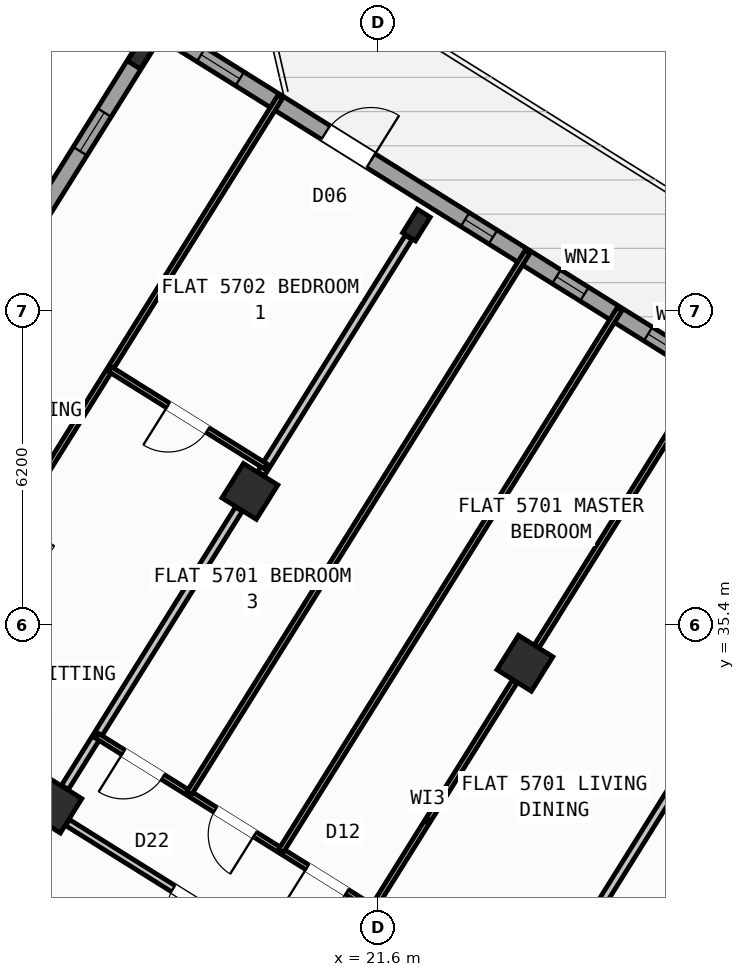
"""IFC4 building model, lengths in metres.
Left out: names, types, materials, properties, quantities, classifications, styles, units other than length and angle.
Written with IfcOpenShell. Run it as: python <this file> out.ifc"""

import sys

from ifc_helpers import new_model, si_unit, direction, frame, frame_2d, origin, origin_2d, place, context, subcontext, project, spatial, rectangle, hollow_rectangle, i_section, extrude, source, transform, mapped, element, fill, save


model = new_model("IFC4")
c1 = context("Model", 3, precision=1e-05, world=origin(), true_north=direction((0.0, 1.0)))
c2 = subcontext(c1, "Body", "Model", "MODEL_VIEW")
j1 = project(units=[si_unit("LENGTHUNIT", "METRE"), si_unit("PLANEANGLEUNIT", "RADIAN")], contexts=[c1])
p1 = place(None, origin())
s1 = spatial("IfcSite", under=j1, at=p1, CompositionType="ELEMENT")
p2 = place(p1, origin())
s2 = spatial("IfcBuilding", under=s1, at=p2, CompositionType="ELEMENT")
p3 = place(p2, frame((0.0, 0.0, 225.6)))
s3 = spatial("IfcBuildingStorey", under=s2, at=p3, CompositionType="ELEMENT", Elevation=225.6)
m1 = source(origin(), c2, "Body", "SweptSolid", [
    extrude(hollow_rectangle(XDim=0.8, YDim=0.8, WallThickness=0.032, at=origin_2d()), origin(), (0.0, 0.0, 1.0), 3.6),
])
p4 = place(p3, frame((24.5, 34.643, 0.0), z_axis=(0.0, 0.0, 1.0), x_axis=(-0.848048096156, 0.529919264233, 0.0)))
e1 = element("IfcColumn", 1, at=p4, inside=s3, PredefinedType="COLUMN", context=c2, shape_type="MappedRepresentation", body=[
    mapped(m1, transform((0.0, 0.0, 0.0), scale=1.0)),
])
m2 = source(origin(), c2, "Body", "SweptSolid", [
    extrude(i_section(OverallWidth=0.3, OverallDepth=0.55, WebThickness=0.015, FlangeThickness=0.029, at=origin_2d()), origin(), (0.0, 0.0, 1.0), 3.6),
])
p5 = place(p3, frame((22.358, 43.292, 0.0), z_axis=(0.0, 0.0, 1.0), x_axis=(-0.848048096156, 0.529919264233, 0.0)))
e2 = element("IfcColumn", 2, at=p5, inside=s3, PredefinedType="COLUMN", context=c2, shape_type="MappedRepresentation", body=[
    mapped(m2, transform((0.0, 0.0, 0.0), scale=1.0)),
])
for number, where, z_axis, x_axis in (
    (3, (19.073, 38.034, 0.0), (0.0, 0.0, 1.0), (-0.848, 0.53, 0.0)),
    (4, (15.205, 31.844, 0.0), (0.0, 0.0, 1.0), (-0.848, 0.53, 0.0)),
):
    element("IfcColumn", number, at=place(p3, frame(where, z_axis=z_axis, x_axis=x_axis)), inside=s3, PredefinedType="COLUMN", context=c2, shape_type="MappedRepresentation", body=[
        mapped(m1, transform((0.0, 0.0, 0.0), scale=1.0)),
    ])
p6 = place(p3, frame((16.931, 46.684, 0.0), z_axis=(0.0, 0.0, 1.0), x_axis=(-0.848048096156, 0.529919264233, 0.0)))
e5 = element("IfcColumn", 5, at=p6, inside=s3, PredefinedType="COLUMN", context=c2, shape_type="MappedRepresentation", body=[
    mapped(m2, transform((0.0, 0.0, 0.0), scale=1.0)),
])
p7 = place(p3, frame((5.7, 28.71, 0.0), z_axis=(0.0, 0.0, 1.0), x_axis=(0.529923711467, 0.8480453172, 0.0)))
e6 = element("IfcWall", 6, at=p7, inside=s3, PredefinedType="STANDARD", context=c2, shape_type="SweptSolid", body=[
    extrude(rectangle(XDim=21.587, YDim=0.32, at=frame_2d((10.794, 0.0))), origin(), (0.0, 0.0, 1.0), 2.825),
])
p8 = place(p7, frame((1.329, 0.0, 1.0)))
e7 = element("IfcOpeningElement", 7, at=p8, cuts=e6, PredefinedType="OPENING", context=c2, shape_type="SweptSolid", body=[
    extrude(rectangle(XDim=0.9, YDim=1.25, at=frame_2d((0.45, 0.625))), frame((0.0, 0.17, 0.0), z_axis=(0.0, -1.0, 0.0), x_axis=(1.0, 0.0, 0.0)), (0.0, 0.0, 1.0), 0.34),
])
p9 = place(p7, frame((5.859, 0.0, 1.0)))
e8 = element("IfcOpeningElement", 8, at=p9, cuts=e6, PredefinedType="OPENING", context=c2, shape_type="SweptSolid", body=[
    extrude(rectangle(XDim=0.9, YDim=1.25, at=frame_2d((0.45, 0.625))), frame((0.0, 0.17, 0.0), z_axis=(0.0, -1.0, 0.0), x_axis=(1.0, 0.0, 0.0)), (0.0, 0.0, 1.0), 0.34),
])
p10 = place(p7, frame((10.369, 0.0, 0.95)))
e9 = element("IfcOpeningElement", 9, at=p10, cuts=e6, PredefinedType="OPENING", context=c2, shape_type="SweptSolid", body=[
    extrude(rectangle(XDim=1.95, YDim=1.35, at=frame_2d((0.975, 0.675))), frame((0.0, 0.17, 0.0), z_axis=(0.0, -1.0, 0.0), x_axis=(1.0, 0.0, 0.0)), (0.0, 0.0, 1.0), 0.34),
])
p11 = place(p7, frame((16.5, 0.0, 1.0)))
e10 = element("IfcOpeningElement", 10, at=p11, cuts=e6, PredefinedType="OPENING", context=c2, shape_type="SweptSolid", body=[
    extrude(rectangle(XDim=0.9, YDim=1.25, at=frame_2d((0.45, 0.625))), frame((0.0, 0.17, 0.0), z_axis=(0.0, -1.0, 0.0), x_axis=(1.0, 0.0, 0.0)), (0.0, 0.0, 1.0), 0.34),
])
p12 = place(p7, frame((18.913, 0.0, 1.0)))
e11 = element("IfcOpeningElement", 11, at=p12, cuts=e6, PredefinedType="OPENING", context=c2, shape_type="SweptSolid", body=[
    extrude(rectangle(XDim=0.9, YDim=1.25, at=frame_2d((0.45, 0.625))), frame((0.0, 0.17, 0.0), z_axis=(0.0, -1.0, 0.0), x_axis=(1.0, 0.0, 0.0)), (0.0, 0.0, 1.0), 0.34),
])
p13 = place(p3, frame((17.424, 47.083, 0.0), z_axis=(0.0, 0.0, 1.0), x_axis=(0.848049927979, -0.529916332693, 0.0)))
e12 = element("IfcWall", 12, at=p13, inside=s3, PredefinedType="STANDARD", context=c2, shape_type="SweptSolid", body=[
    extrude(rectangle(XDim=29.223, YDim=0.32, at=frame_2d((14.612, 0.0))), origin(), (0.0, 0.0, 1.0), 3.35),
])
p14 = place(p13, frame((3.709, 0.0, 0.0)))
e13 = element("IfcOpeningElement", 13, at=p14, cuts=e12, PredefinedType="OPENING", context=c2, shape_type="SweptSolid", body=[
    extrude(rectangle(XDim=1.05, YDim=2.15, at=frame_2d((0.525, 1.075))), frame((0.0, 0.17, 0.0), z_axis=(0.0, -1.0, 0.0), x_axis=(1.0, 0.0, 0.0)), (0.0, 0.0, 1.0), 0.34),
])
p15 = place(p13, frame((0.809, 0.0, 1.0)))
e14 = element("IfcOpeningElement", 14, at=p15, cuts=e12, PredefinedType="OPENING", context=c2, shape_type="SweptSolid", body=[
    extrude(rectangle(XDim=0.9, YDim=1.25, at=frame_2d((0.45, 0.625))), frame((0.0, 0.17, 0.0), z_axis=(0.0, -1.0, 0.0), x_axis=(1.0, 0.0, 0.0)), (0.0, 0.0, 1.0), 0.34),
])
p16 = place(p13, frame((13.811, 0.0, 0.9)))
e15 = element("IfcOpeningElement", 15, at=p16, cuts=e12, PredefinedType="OPENING", context=c2, shape_type="SweptSolid", body=[
    extrude(rectangle(XDim=1.35, YDim=1.45, at=frame_2d((0.675, 0.725))), frame((0.0, 0.17, 0.0), z_axis=(0.0, -1.0, 0.0), x_axis=(1.0, 0.0, 0.0)), (0.0, 0.0, 1.0), 0.34),
])
p17 = place(p13, frame((17.254, 0.0, 1.0)))
e16 = element("IfcOpeningElement", 16, at=p17, cuts=e12, PredefinedType="OPENING", context=c2, shape_type="SweptSolid", body=[
    extrude(rectangle(XDim=0.9, YDim=1.25, at=frame_2d((0.45, 0.625))), frame((0.0, 0.17, 0.0), z_axis=(0.0, -1.0, 0.0), x_axis=(1.0, 0.0, 0.0)), (0.0, 0.0, 1.0), 0.34),
])
p18 = place(p13, frame((21.364, 0.0, 1.0)))
e17 = element("IfcOpeningElement", 17, at=p18, cuts=e12, PredefinedType="OPENING", context=c2, shape_type="SweptSolid", body=[
    extrude(rectangle(XDim=0.9, YDim=1.25, at=frame_2d((0.45, 0.625))), frame((0.0, 0.17, 0.0), z_axis=(0.0, -1.0, 0.0), x_axis=(1.0, 0.0, 0.0)), (0.0, 0.0, 1.0), 0.34),
])
p19 = place(p13, frame((26.003, 0.0, 1.0)))
e18 = element("IfcOpeningElement", 18, at=p19, cuts=e12, PredefinedType="OPENING", context=c2, shape_type="SweptSolid", body=[
    extrude(rectangle(XDim=0.9, YDim=1.25, at=frame_2d((0.45, 0.625))), frame((0.0, 0.17, 0.0), z_axis=(0.0, -1.0, 0.0), x_axis=(1.0, 0.0, 0.0)), (0.0, 0.0, 1.0), 0.34),
])
p20 = place(p13, frame((11.211, 0.0, 1.0)))
e19 = element("IfcOpeningElement", 19, at=p20, cuts=e12, PredefinedType="OPENING", context=c2, shape_type="SweptSolid", body=[
    extrude(rectangle(XDim=0.65, YDim=1.15, at=frame_2d((0.325, 0.575))), frame((0.0, 0.17, 0.0), z_axis=(0.0, -1.0, 0.0), x_axis=(1.0, 0.0, 0.0)), (0.0, 0.0, 1.0), 0.34),
])
p21 = place(p13, frame((9.079, 0.0, 1.0)))
e20 = element("IfcOpeningElement", 20, at=p21, cuts=e12, PredefinedType="OPENING", context=c2, shape_type="SweptSolid", body=[
    extrude(rectangle(XDim=0.65, YDim=1.15, at=frame_2d((0.325, 0.575))), frame((0.0, 0.17, 0.0), z_axis=(0.0, -1.0, 0.0), x_axis=(1.0, 0.0, 0.0)), (0.0, 0.0, 1.0), 0.34),
])
p22 = place(p13, frame((6.951, 0.0, 1.0)))
e21 = element("IfcOpeningElement", 21, at=p22, cuts=e12, PredefinedType="OPENING", context=c2, shape_type="SweptSolid", body=[
    extrude(rectangle(XDim=0.65, YDim=1.15, at=frame_2d((0.325, 0.575))), frame((0.0, 0.17, 0.0), z_axis=(0.0, -1.0, 0.0), x_axis=(1.0, 0.0, 0.0)), (0.0, 0.0, 1.0), 0.34),
])
p23 = place(p3, frame((31.239, 38.274, 0.0), z_axis=(0.0, 0.0, 1.0), x_axis=(-0.529921796515, -0.848046513806, 0.0)))
e22 = element("IfcWall", 22, at=p23, inside=s3, PredefinedType="PARTITIONING", context=c2, shape_type="SweptSolid", body=[
    extrude(rectangle(XDim=16.5, YDim=0.16, at=frame_2d((8.25, 0.0))), origin(), (0.0, 0.0, 1.0), 3.34),
])
p24 = place(p3, frame((22.495, 24.281, 0.0), z_axis=(0.0, 0.0, 1.0), x_axis=(-0.848052408131, 0.529912363569, 0.0)))
e23 = element("IfcWall", 23, at=p24, inside=s3, PredefinedType="PARTITIONING", context=c2, shape_type="SweptSolid", body=[
    extrude(rectangle(XDim=16.73, YDim=0.16, at=frame_2d((8.365, 0.0))), origin(), (0.0, 0.0, 1.0), 3.34),
])
p25 = place(p24, frame((1.385, 0.0, 0.0)))
e24 = element("IfcOpeningElement", 24, at=p25, cuts=e23, PredefinedType="OPENING", context=c2, shape_type="SweptSolid", body=[
    extrude(rectangle(XDim=1.0, YDim=2.1, at=frame_2d((0.5, 1.05))), frame((0.0, 0.09, 0.0), z_axis=(0.0, -1.0, 0.0), x_axis=(1.0, 0.0, 0.0)), (0.0, 0.0, 1.0), 0.18),
])
p26 = place(p24, frame((14.76, 0.0, 0.0)))
e25 = element("IfcOpeningElement", 25, at=p26, cuts=e23, PredefinedType="OPENING", context=c2, shape_type="SweptSolid", body=[
    extrude(rectangle(XDim=1.0, YDim=2.1, at=frame_2d((0.5, 1.05))), frame((0.0, 0.09, 0.0), z_axis=(0.0, -1.0, 0.0), x_axis=(1.0, 0.0, 0.0)), (0.0, 0.0, 1.0), 0.18),
])
p27 = place(p3, frame((21.329, 22.416, 0.0), z_axis=(0.0, 0.0, 1.0), x_axis=(-0.848052408131, 0.529912363569, 0.0)))
e26 = element("IfcWall", 26, at=p27, inside=s3, PredefinedType="PARTITIONING", context=c2, shape_type="SweptSolid", body=[
    extrude(rectangle(XDim=16.73, YDim=0.16, at=frame_2d((8.365, 0.0))), origin(), (0.0, 0.0, 1.0), 3.34),
])
p28 = place(p27, frame((1.505, 0.0, 0.0)))
e27 = element("IfcOpeningElement", 27, at=p28, cuts=e26, PredefinedType="OPENING", context=c2, shape_type="SweptSolid", body=[
    extrude(rectangle(XDim=1.0, YDim=2.1, at=frame_2d((0.5, 1.05))), frame((0.0, 0.09, 0.0), z_axis=(0.0, -1.0, 0.0), x_axis=(1.0, 0.0, 0.0)), (0.0, 0.0, 1.0), 0.18),
])
p29 = place(p27, frame((6.435, 0.0, 0.0)))
e28 = element("IfcOpeningElement", 28, at=p29, cuts=e26, PredefinedType="OPENING", context=c2, shape_type="SweptSolid", body=[
    extrude(rectangle(XDim=1.0, YDim=2.1, at=frame_2d((0.5, 1.05))), frame((0.0, 0.09, 0.0), z_axis=(0.0, -1.0, 0.0), x_axis=(1.0, 0.0, 0.0)), (0.0, 0.0, 1.0), 0.18),
])
p30 = place(p27, frame((12.784, 0.0, 0.0)))
e29 = element("IfcOpeningElement", 29, at=p30, cuts=e26, PredefinedType="OPENING", context=c2, shape_type="SweptSolid", body=[
    extrude(rectangle(XDim=1.0, YDim=2.1, at=frame_2d((0.5, 1.05))), frame((0.0, 0.09, 0.0), z_axis=(0.0, -1.0, 0.0), x_axis=(1.0, 0.0, 0.0)), (0.0, 0.0, 1.0), 0.18),
])
p31 = place(p3, frame((22.206, 43.049, 0.0), z_axis=(0.0, 0.0, 1.0), x_axis=(-0.529919150083, -0.848048167486, 0.0)))
e30 = element("IfcWall", 30, at=p31, inside=s3, PredefinedType="PARTITIONING", context=c2, shape_type="SweptSolid", body=[
    extrude(rectangle(XDim=5.501, YDim=0.16, at=frame_2d((2.75, 0.0))), origin(), (0.0, 0.0, 1.0), 2.825),
])
p32 = place(p3, frame((18.854, 37.685, 0.0), z_axis=(0.0, 0.0, 1.0), x_axis=(-0.529907440938, -0.848055484057, 0.0)))
e31 = element("IfcWall", 31, at=p32, inside=s3, PredefinedType="PARTITIONING", context=c2, shape_type="SweptSolid", body=[
    extrude(rectangle(XDim=6.476, YDim=0.16, at=frame_2d((3.238, 0.0))), origin(), (0.0, 0.0, 1.0), 2.825),
])
p33 = place(p3, frame((27.651, 39.647, 0.0), z_axis=(0.0, 0.0, 1.0), x_axis=(-0.529919150083, -0.848048167486, 0.0)))
e32 = element("IfcWall", 32, at=p33, inside=s3, PredefinedType="PARTITIONING", context=c2, shape_type="SweptSolid", body=[
    extrude(rectangle(XDim=5.501, YDim=0.11, at=frame_2d((2.75, 0.0))), origin(), (0.0, 0.0, 1.0), 2.825),
])
p34 = place(p3, frame((24.299, 34.283, 0.0), z_axis=(0.0, 0.0, 1.0), x_axis=(-0.529890499457, -0.848066069705, 0.0)))
e33 = element("IfcWall", 33, at=p34, inside=s3, PredefinedType="PARTITIONING", context=c2, shape_type="SweptSolid", body=[
    extrude(rectangle(XDim=6.476, YDim=0.11, at=frame_2d((3.238, 0.0))), origin(), (0.0, 0.0, 1.0), 2.825),
])
p35 = place(p34, frame((5.496, 0.0, 0.0)))
e34 = element("IfcOpeningElement", 34, at=p35, cuts=e33, PredefinedType="OPENING", context=c2, shape_type="SweptSolid", body=[
    extrude(rectangle(XDim=0.78, YDim=2.05, at=frame_2d((0.39, 1.025))), frame((0.0, 0.065, 0.0), z_axis=(0.0, -1.0, 0.0), x_axis=(1.0, 0.0, 0.0)), (0.0, 0.0, 1.0), 0.13),
])
p36 = place(p3, frame((20.203, 28.543, 0.0), z_axis=(0.0, 0.0, 1.0), x_axis=(-0.848049955116, 0.529916289265, 0.0)))
e35 = element("IfcWall", 35, at=p36, inside=s3, PredefinedType="PLUMBINGWALL", context=c2, shape_type="SweptSolid", body=[
    extrude(rectangle(XDim=5.576, YDim=0.14, at=frame_2d((2.788, 0.0))), origin(), (0.0, 0.0, 1.0), 2.825),
])
p37 = place(p36, frame((2.338, 0.0, 0.0)))
e36 = element("IfcOpeningElement", 36, at=p37, cuts=e35, PredefinedType="OPENING", context=c2, shape_type="SweptSolid", body=[
    extrude(rectangle(XDim=0.78, YDim=2.05, at=frame_2d((0.39, 1.025))), frame((0.0, 0.08, 0.0), z_axis=(0.0, -1.0, 0.0), x_axis=(1.0, 0.0, 0.0)), (0.0, 0.0, 1.0), 0.16),
])
p38 = place(p3, frame((21.502, 29.807, 0.0), z_axis=(0.0, 0.0, 1.0), x_axis=(-0.848051709137, 0.529913482212, 0.0)))
e37 = element("IfcWall", 37, at=p38, inside=s3, PredefinedType="PARTITIONING", context=c2, shape_type="SweptSolid", body=[
    extrude(rectangle(XDim=6.42, YDim=0.11, at=frame_2d((3.21, 0.0))), origin(), (0.0, 0.0, 1.0), 3.34),
])
p39 = place(p38, frame((0.61, 0.0, 0.0)))
e38 = element("IfcOpeningElement", 38, at=p39, cuts=e37, PredefinedType="OPENING", context=c2, shape_type="SweptSolid", body=[
    extrude(rectangle(XDim=0.92, YDim=2.08, at=frame_2d((0.46, 1.04))), frame((0.0, 0.065, 0.0), z_axis=(0.0, -1.0, 0.0), x_axis=(1.0, 0.0, 0.0)), (0.0, 0.0, 1.0), 0.13),
])
p40 = place(p38, frame((2.75, 0.0, 0.0)))
e39 = element("IfcOpeningElement", 39, at=p40, cuts=e37, PredefinedType="OPENING", context=c2, shape_type="SweptSolid", body=[
    extrude(rectangle(XDim=0.92, YDim=2.08, at=frame_2d((0.46, 1.04))), frame((0.0, 0.065, 0.0), z_axis=(0.0, -1.0, 0.0), x_axis=(1.0, 0.0, 0.0)), (0.0, 0.0, 1.0), 0.13),
])
p41 = place(p38, frame((4.89, 0.0, 0.0)))
e40 = element("IfcOpeningElement", 40, at=p41, cuts=e37, PredefinedType="OPENING", context=c2, shape_type="SweptSolid", body=[
    extrude(rectangle(XDim=0.92, YDim=2.08, at=frame_2d((0.46, 1.04))), frame((0.0, 0.065, 0.0), z_axis=(0.0, -1.0, 0.0), x_axis=(1.0, 0.0, 0.0)), (0.0, 0.0, 1.0), 0.13),
])
p42 = place(p3, frame((26.37, 41.635, 0.0), z_axis=(0.0, 0.0, 1.0), x_axis=(-0.529925845384, -0.848043983761, 0.0)))
e41 = element("IfcWall", 41, at=p42, inside=s3, PredefinedType="PARTITIONING", context=c2, shape_type="SweptSolid", body=[
    extrude(rectangle(XDim=12.61, YDim=0.11, at=frame_2d((6.305, 0.0))), origin(), (0.0, 0.0, 1.0), 2.995),
])
p43 = place(p3, frame((24.555, 42.769, 0.0), z_axis=(0.0, 0.0, 1.0), x_axis=(-0.529911921261, -0.848052684511, 0.0)))
e42 = element("IfcWall", 42, at=p43, inside=s3, PredefinedType="PARTITIONING", context=c2, shape_type="SweptSolid", body=[
    extrude(rectangle(XDim=12.61, YDim=0.11, at=frame_2d((6.305, 0.0))), origin(), (0.0, 0.0, 1.0), 2.995),
])
p44 = place(p3, frame((19.67, 45.821, 0.0), z_axis=(0.0, 0.0, 1.0), x_axis=(-0.529920421309, -0.848047373134, 0.0)))
e43 = element("IfcWall", 43, at=p44, inside=s3, PredefinedType="PARTITIONING", context=c2, shape_type="SweptSolid", body=[
    extrude(rectangle(XDim=16.77, YDim=0.11, at=frame_2d((8.385, 0.0))), origin(), (0.0, 0.0, 1.0), 3.34),
])
p45 = place(p44, frame((15.13, 0.0, 0.0)))
e44 = element("IfcOpeningElement", 44, at=p45, cuts=e43, PredefinedType="OPENING", context=c2, shape_type="SweptSolid", body=[
    extrude(rectangle(XDim=0.78, YDim=2.05, at=frame_2d((0.39, 1.025))), frame((0.0, 0.065, 0.0), z_axis=(0.0, -1.0, 0.0), x_axis=(1.0, 0.0, 0.0)), (0.0, 0.0, 1.0), 0.13),
])
p46 = place(p44, frame((9.884, 0.0, 0.0)))
e45 = element("IfcOpeningElement", 45, at=p46, cuts=e43, PredefinedType="OPENING", context=c2, shape_type="SweptSolid", body=[
    extrude(rectangle(XDim=0.92, YDim=2.08, at=frame_2d((0.46, 1.04))), frame((0.0, 0.065, 0.0), z_axis=(0.0, -1.0, 0.0), x_axis=(1.0, 0.0, 0.0)), (0.0, 0.0, 1.0), 0.13),
])
p47 = place(p3, frame((19.382, 38.529, 0.0), z_axis=(0.0, 0.0, 1.0), x_axis=(-0.848051346257, 0.52991406295, 0.0)))
e46 = element("IfcWall", 46, at=p47, inside=s3, PredefinedType="PARTITIONING", context=c2, shape_type="SweptSolid", body=[
    extrude(rectangle(XDim=3.62, YDim=0.11, at=frame_2d((1.81, 0.0))), origin(), (0.0, 0.0, 1.0), 3.34),
])
p48 = place(p47, frame((1.35, 0.0, 0.0)))
e47 = element("IfcOpeningElement", 47, at=p48, cuts=e46, PredefinedType="OPENING", context=c2, shape_type="SweptSolid", body=[
    extrude(rectangle(XDim=0.92, YDim=2.08, at=frame_2d((0.46, 1.04))), frame((0.0, 0.065, 0.0), z_axis=(0.0, -1.0, 0.0), x_axis=(1.0, 0.0, 0.0)), (0.0, 0.0, 1.0), 0.13),
])
m3 = source(origin(), c2, "Body", "SweptSolid", [
    extrude(rectangle(XDim=1.05, YDim=2.15, at=frame_2d((0.525, 1.075))), frame((0.0, 0.025, 0.0), z_axis=(0.0, -1.0, 0.0), x_axis=(1.0, 0.0, 0.0)), (0.0, 0.0, 1.0), 0.05),
])
p49 = place(p14, origin())
e48 = element("IfcDoor", 48, at=p49, inside=s3, OperationType="SINGLE_SWING_RIGHT", PredefinedType="DOOR", context=c2, shape_type="MappedRepresentation", body=[
    mapped(m3, transform((0.0, 0.0, 0.0), scale=1.0)),
])
fill(e13, e48)
m4 = source(origin(), c2, "Body", "SweptSolid", [
    extrude(rectangle(XDim=0.9, YDim=1.25, at=frame_2d((0.45, 0.625))), frame((0.0, 0.03, 0.0), z_axis=(0.0, -1.0, 0.0), x_axis=(1.0, 0.0, 0.0)), (0.0, 0.0, 1.0), 0.06),
])
p50 = place(p12, origin())
e49 = element("IfcWindow", 49, at=p50, inside=s3, PartitioningType="SINGLE_PANEL", PredefinedType="WINDOW", context=c2, shape_type="MappedRepresentation", body=[
    mapped(m4, transform((0.0, 0.0, 0.0), scale=1.0)),
])
fill(e11, e49)
p51 = place(p15, origin())
e50 = element("IfcWindow", 50, at=p51, inside=s3, PartitioningType="SINGLE_PANEL", PredefinedType="WINDOW", context=c2, shape_type="MappedRepresentation", body=[
    mapped(m4, transform((0.0, 0.0, 0.0), scale=1.0)),
])
fill(e14, e50)
m5 = source(origin(), c2, "Body", "SweptSolid", [
    extrude(rectangle(XDim=0.65, YDim=1.15, at=frame_2d((0.325, 0.575))), frame((0.0, 0.03, 0.0), z_axis=(0.0, -1.0, 0.0), x_axis=(1.0, 0.0, 0.0)), (0.0, 0.0, 1.0), 0.06),
])
p52 = place(p20, origin())
e51 = element("IfcWindow", 51, at=p52, inside=s3, PartitioningType="SINGLE_PANEL", PredefinedType="WINDOW", context=c2, shape_type="MappedRepresentation", body=[
    mapped(m5, transform((0.0, 0.0, 0.0), scale=1.0)),
])
fill(e19, e51)
p53 = place(p21, origin())
e52 = element("IfcWindow", 52, at=p53, inside=s3, PartitioningType="SINGLE_PANEL", PredefinedType="WINDOW", context=c2, shape_type="MappedRepresentation", body=[
    mapped(m5, transform((0.0, 0.0, 0.0), scale=1.0)),
])
fill(e20, e52)
p54 = place(p22, origin())
e53 = element("IfcWindow", 53, at=p54, inside=s3, PartitioningType="SINGLE_PANEL", PredefinedType="WINDOW", context=c2, shape_type="MappedRepresentation", body=[
    mapped(m5, transform((0.0, 0.0, 0.0), scale=1.0)),
])
fill(e21, e53)
m6 = source(origin(), c2, "Body", "SweptSolid", [
    extrude(rectangle(XDim=0.78, YDim=2.05, at=frame_2d((0.39, 1.025))), frame((0.0, 0.025, 0.0), z_axis=(0.0, -1.0, 0.0), x_axis=(1.0, 0.0, 0.0)), (0.0, 0.0, 1.0), 0.05),
])
p55 = place(p37, origin())
e54 = element("IfcDoor", 54, at=p55, inside=s3, OperationType="SINGLE_SWING_LEFT", PredefinedType="DOOR", context=c2, shape_type="MappedRepresentation", body=[
    mapped(m6, transform((0.0, 0.0, 0.0), scale=1.0)),
])
fill(e36, e54)
m7 = source(origin(), c2, "Body", "SweptSolid", [
    extrude(rectangle(XDim=0.92, YDim=2.08, at=frame_2d((0.46, 1.04))), frame((0.0, 0.025, 0.0), z_axis=(0.0, -1.0, 0.0), x_axis=(1.0, 0.0, 0.0)), (0.0, 0.0, 1.0), 0.05),
])
p56 = place(p39, origin())
e55 = element("IfcDoor", 55, at=p56, inside=s3, OperationType="SINGLE_SWING_RIGHT", PredefinedType="DOOR", context=c2, shape_type="MappedRepresentation", body=[
    mapped(m7, transform((0.0, 0.0, 0.0), scale=1.0)),
])
fill(e38, e55)
p57 = place(p40, origin())
e56 = element("IfcDoor", 56, at=p57, inside=s3, OperationType="SINGLE_SWING_LEFT", PredefinedType="DOOR", context=c2, shape_type="MappedRepresentation", body=[
    mapped(m7, transform((0.0, 0.0, 0.0), scale=1.0)),
])
fill(e39, e56)
p58 = place(p41, origin())
e57 = element("IfcDoor", 57, at=p58, inside=s3, OperationType="SINGLE_SWING_RIGHT", PredefinedType="DOOR", context=c2, shape_type="MappedRepresentation", body=[
    mapped(m7, transform((0.0, 0.0, 0.0), scale=1.0)),
])
fill(e40, e57)
p59 = place(p48, origin())
e58 = element("IfcDoor", 58, at=p59, inside=s3, OperationType="SINGLE_SWING_RIGHT", PredefinedType="DOOR", context=c2, shape_type="MappedRepresentation", body=[
    mapped(m7, transform((0.0, 0.0, 0.0), scale=1.0)),
])
fill(e47, e58)
save(model, sys.argv[1])
